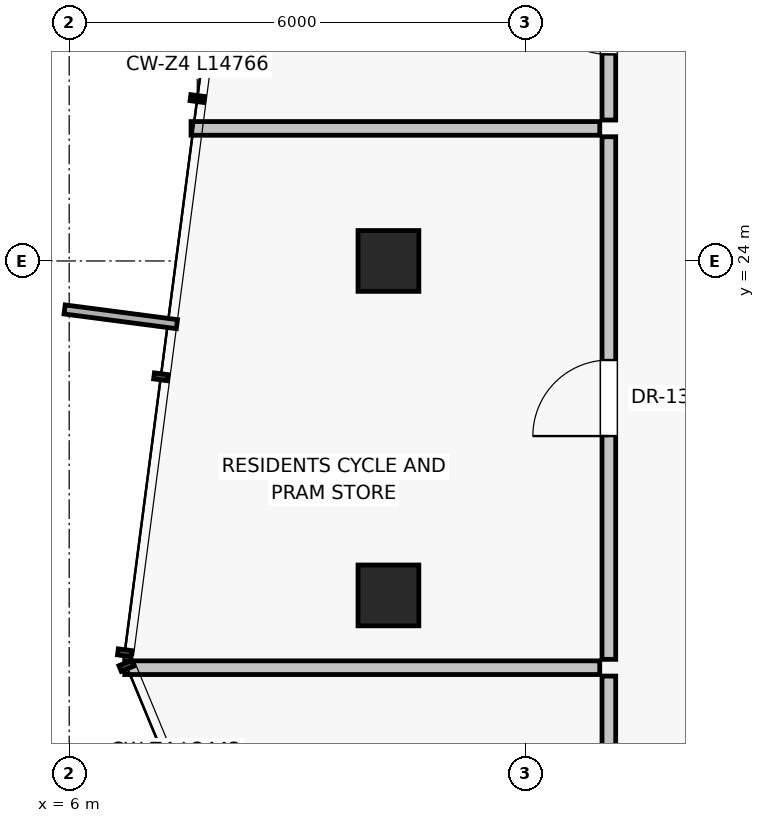
"""IFC4 building model, lengths in metres.
Left out: names, types, materials, properties, quantities, classifications, styles, units other than length and angle.
Written with IfcOpenShell. Run it as: python <this file> out.ifc"""

import sys

from ifc_helpers import new_model, si_unit, direction, frame, frame_2d, origin, origin_2d, place, context, subcontext, project, spatial, rectangle, extrude, source, transform, mapped, element, fill, save


model = new_model("IFC4")
c1 = context("Model", 3, precision=1e-05, world=origin(), true_north=direction((0.0, 1.0)))
c2 = subcontext(c1, "Body", "Model", "MODEL_VIEW")
j1 = project(units=[si_unit("LENGTHUNIT", "METRE"), si_unit("PLANEANGLEUNIT", "RADIAN")], contexts=[c1])
p1 = place(None, origin())
s1 = spatial("IfcSite", under=j1, at=p1, CompositionType="ELEMENT")
p2 = place(p1, origin())
s2 = spatial("IfcBuilding", under=s1, at=p2, CompositionType="ELEMENT")
p3 = place(p2, frame((0.0, 0.0, 233.3)))
s3 = spatial("IfcBuildingStorey", under=s2, at=p3, CompositionType="ELEMENT", Elevation=233.3)
for number, where, z_axis, x_axis in (
    (1, (10.2, 24.0, 0.0), (0.0, 0.0, 1.0), (1.0, 0.0, 0.0)),
    (2, (10.2, 19.6, 0.0), (0.0, 0.0, 1.0), (1.0, 0.0, 0.0)),
):
    element("IfcColumn", number, at=place(p3, frame(where, z_axis=z_axis, x_axis=x_axis)), inside=s3, PredefinedType="COLUMN", context=c2, shape_type="SweptSolid", body=[
        extrude(rectangle(XDim=0.8, YDim=0.8, at=origin_2d()), origin(), (0.0, 0.0, 1.0), 3.25),
    ])
p4 = place(p3, frame((13.1, 14.41, 0.0), z_axis=(0.0, 0.0, 1.0), x_axis=(0.0, 1.0, 0.0)))
e3 = element("IfcWall", 3, at=p4, inside=s3, PredefinedType="PARTITIONING", context=c2, shape_type="SweptSolid", body=[
    extrude(rectangle(XDim=4.129, YDim=0.18, at=frame_2d((2.064, 0.0))), origin(), (0.0, 0.0, 1.0), 2.662),
])
p5 = place(p4, frame((1.564, 0.0, 0.0)))
e4 = element("IfcOpeningElement", 4, at=p5, cuts=e3, PredefinedType="OPENING", context=c2, shape_type="SweptSolid", body=[
    extrude(rectangle(XDim=1.0, YDim=2.01, at=frame_2d((0.5, 1.005))), frame((0.0, 0.1, 0.0), z_axis=(0.0, -1.0, 0.0), x_axis=(1.0, 0.0, 0.0)), (0.0, 0.0, 1.0), 0.2),
])
p6 = place(p3, frame((13.1, 18.759, 0.0), z_axis=(0.0, 0.0, 1.0), x_axis=(0.0, 1.0, 0.0)))
e5 = element("IfcWall", 5, at=p6, inside=s3, PredefinedType="PARTITIONING", context=c2, shape_type="SweptSolid", body=[
    extrude(rectangle(XDim=6.875, YDim=0.18, at=frame_2d((3.438, 0.0))), origin(), (0.0, 0.0, 1.0), 2.662),
])
p7 = place(p6, frame((2.938, 0.0, 0.0)))
e6 = element("IfcOpeningElement", 6, at=p7, cuts=e5, PredefinedType="OPENING", context=c2, shape_type="SweptSolid", body=[
    extrude(rectangle(XDim=1.0, YDim=2.01, at=frame_2d((0.5, 1.005))), frame((0.0, 0.1, 0.0), z_axis=(0.0, -1.0, 0.0), x_axis=(1.0, 0.0, 0.0)), (0.0, 0.0, 1.0), 0.2),
])
p8 = place(p3, frame((12.98, 18.649, 0.0), z_axis=(0.0, 0.0, 1.0), x_axis=(-1.0, 0.0, 0.0)))
e7 = element("IfcWall", 7, at=p8, inside=s3, PredefinedType="PARTITIONING", context=c2, shape_type="SweptSolid", body=[
    extrude(rectangle(XDim=6.25, YDim=0.18, at=frame_2d((3.125, 0.0))), origin(), (0.0, 0.0, 1.0), 3.015),
])
p9 = place(p3, frame((12.98, 25.744, 0.0), z_axis=(0.0, 0.0, 1.0), x_axis=(-1.0, 0.0, 0.0)))
e8 = element("IfcWall", 8, at=p9, inside=s3, PredefinedType="PARTITIONING", context=c2, shape_type="SweptSolid", body=[
    extrude(rectangle(XDim=5.377, YDim=0.18, at=frame_2d((2.688, 0.0))), origin(), (0.0, 0.0, 1.0), 3.015),
])
p10 = place(p3, frame((13.1, 25.854, 0.0), z_axis=(0.0, 0.0, 1.0), x_axis=(0.0, 1.0, 0.0)))
e9 = element("IfcWall", 9, at=p10, inside=s3, PredefinedType="PARTITIONING", context=c2, shape_type="SweptSolid", body=[
    extrude(rectangle(XDim=2.727, YDim=0.18, at=frame_2d((1.364, 0.0))), origin(), (0.0, 0.0, 1.0), 2.662),
])
p11 = place(p10, frame((0.864, 0.0, 0.0)))
e10 = element("IfcOpeningElement", 10, at=p11, cuts=e9, PredefinedType="OPENING", context=c2, shape_type="SweptSolid", body=[
    extrude(rectangle(XDim=1.0, YDim=2.01, at=frame_2d((0.5, 1.005))), frame((0.0, 0.1, 0.0), z_axis=(0.0, -1.0, 0.0), x_axis=(1.0, 0.0, 0.0)), (0.0, 0.0, 1.0), 0.2),
])
m1 = source(origin(), c2, "Body", "SweptSolid", [
    extrude(rectangle(XDim=1.0, YDim=2.01, at=frame_2d((0.5, 1.005))), frame((0.0, 0.025, 0.0), z_axis=(0.0, -1.0, 0.0), x_axis=(1.0, 0.0, 0.0)), (0.0, 0.0, 1.0), 0.05),
])
p12 = place(p7, origin())
e11 = element("IfcDoor", 11, at=p12, inside=s3, OperationType="SINGLE_SWING_LEFT", PredefinedType="DOOR", context=c2, shape_type="MappedRepresentation", body=[
    mapped(m1, transform((0.0, 0.0, 0.0), scale=1.0)),
])
fill(e6, e11)
p13 = place(p11, origin())
e12 = element("IfcDoor", 12, at=p13, inside=s3, OperationType="SINGLE_SWING_RIGHT", PredefinedType="DOOR", context=c2, shape_type="MappedRepresentation", body=[
    mapped(m1, transform((0.0, 0.0, 0.0), scale=1.0)),
])
fill(e10, e12)
save(model, sys.argv[1])
